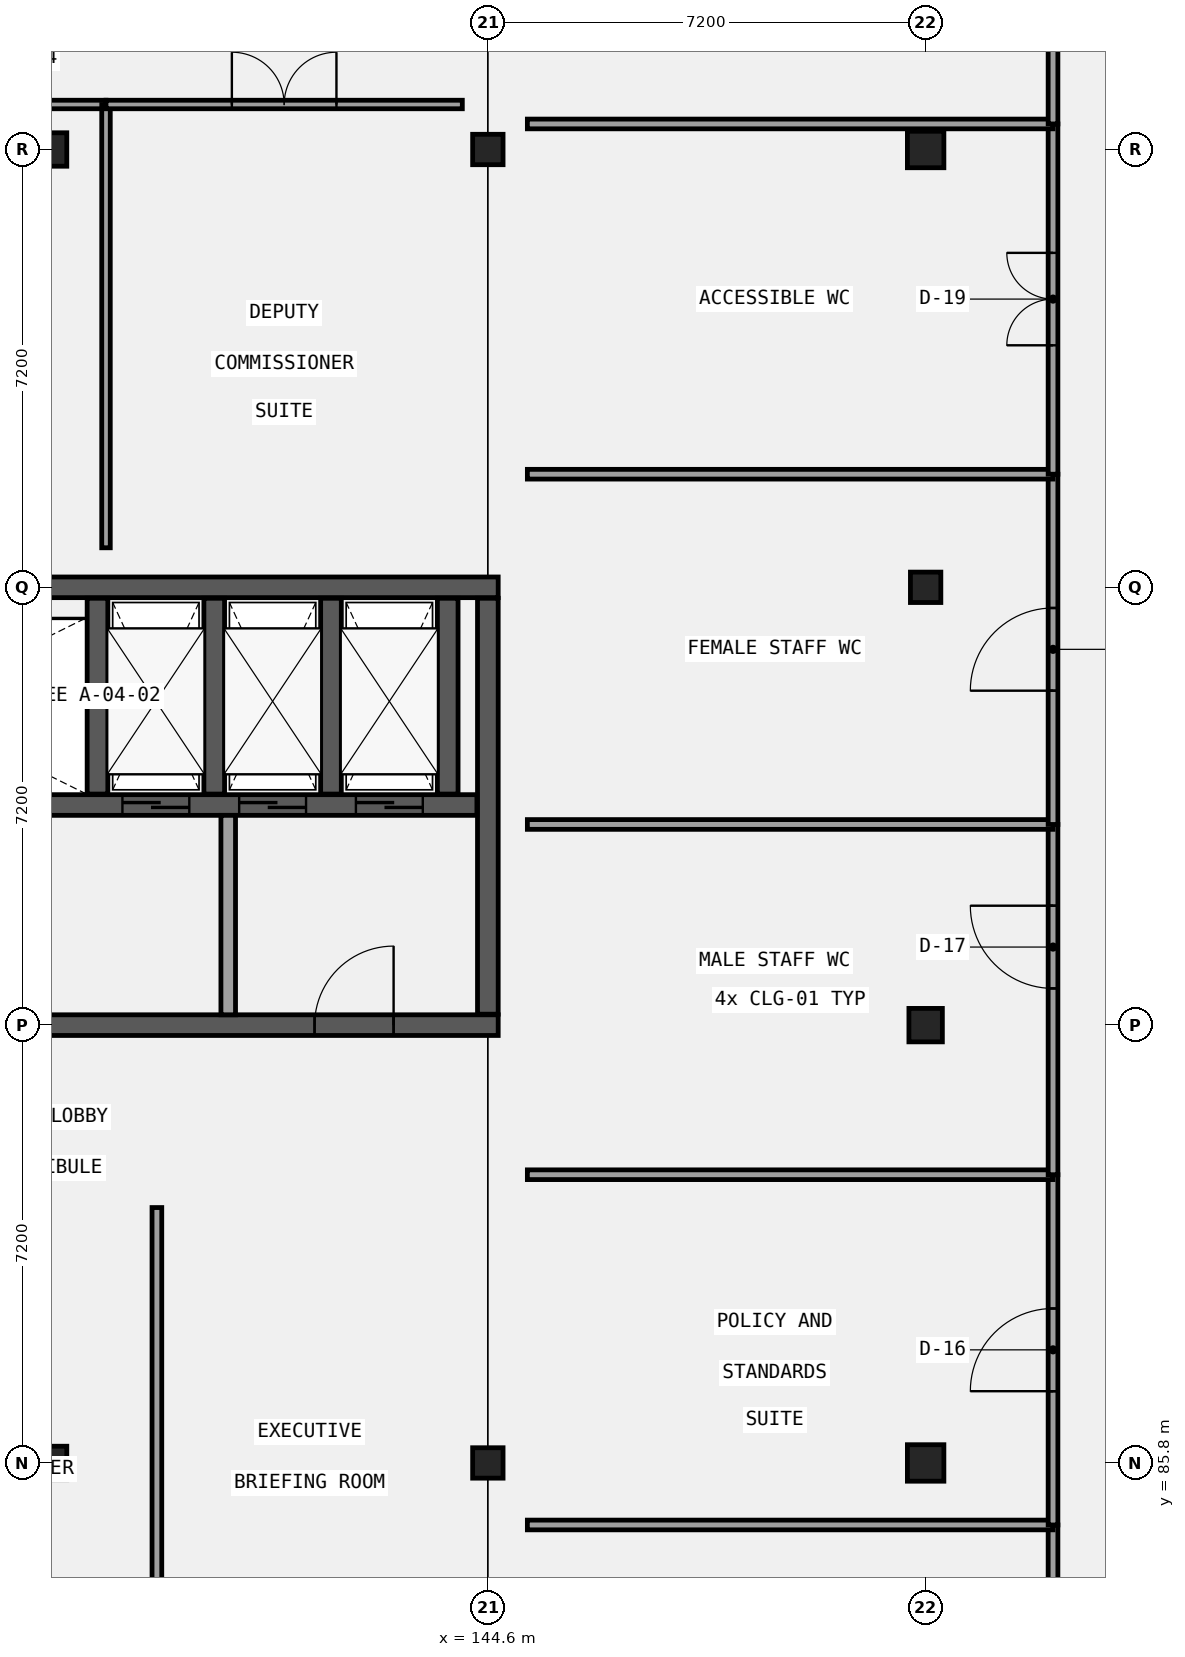
"""IFC4 building model, lengths in metres.
Left out: names, types, materials, properties, quantities, classifications, styles, units other than length and angle.
Written with IfcOpenShell. Run it as: python <this file> out.ifc"""

import sys

from ifc_helpers import new_model, si_unit, direction, frame, frame_2d, origin, origin_2d, place, context, subcontext, project, spatial, rectangle, extrude, element, fill, save


model = new_model("IFC4")
c1 = context("Model", 3, precision=1e-05, world=origin(), true_north=direction((0.0, 1.0)))
c2 = subcontext(c1, "Body", "Model", "MODEL_VIEW")
j1 = project(units=[si_unit("LENGTHUNIT", "METRE"), si_unit("PLANEANGLEUNIT", "RADIAN")], contexts=[c1])
p1 = place(None, origin())
s1 = spatial("IfcSite", under=j1, at=p1, CompositionType="ELEMENT")
p2 = place(p1, origin())
s2 = spatial("IfcBuilding", under=s1, at=p2, CompositionType="ELEMENT")
p3 = place(p2, frame((0.0, 0.0, 22.2)))
s3 = spatial("IfcBuildingStorey", under=s2, at=p3, CompositionType="ELEMENT", Elevation=22.2)
p4 = place(p3, frame((130.03, 100.2, 0.0), z_axis=(0.0, 0.0, 1.0), x_axis=(1.0, 0.0, 0.0)))
e1 = element("IfcWall", 1, at=p4, inside=s3, PredefinedType="SHEAR", context=c2, shape_type="SweptSolid", body=[
    extrude(rectangle(XDim=14.74, YDim=0.34, at=frame_2d((7.37, 0.0))), origin(), (0.0, 0.0, 1.0), 4.2),
])
p5 = place(p3, frame((130.03, 93.0, 0.0), z_axis=(0.0, 0.0, 1.0), x_axis=(1.0, 0.0, 0.0)))
e2 = element("IfcWall", 2, at=p5, inside=s3, PredefinedType="SHEAR", context=c2, shape_type="SweptSolid", body=[
    extrude(rectangle(XDim=14.74, YDim=0.34, at=frame_2d((7.37, 0.0))), origin(), (0.0, 0.0, 1.0), 4.2),
])
p6 = place(p5, frame((3.72, 0.0, 0.0)))
e3 = element("IfcOpeningElement", 3, at=p6, cuts=e2, PredefinedType="OPENING", context=c2, shape_type="SweptSolid", body=[
    extrude(rectangle(XDim=1.3, YDim=2.2, at=frame_2d((0.65, 1.1))), frame((0.0, 0.18, 0.0), z_axis=(0.0, -1.0, 0.0), x_axis=(1.0, 0.0, 0.0)), (0.0, 0.0, 1.0), 0.36),
])
p7 = place(p5, frame((11.72, 0.0, 0.0)))
e4 = element("IfcOpeningElement", 4, at=p7, cuts=e2, PredefinedType="OPENING", context=c2, shape_type="SweptSolid", body=[
    extrude(rectangle(XDim=1.3, YDim=2.2, at=frame_2d((0.65, 1.1))), frame((0.0, 0.18, 0.0), z_axis=(0.0, -1.0, 0.0), x_axis=(1.0, 0.0, 0.0)), (0.0, 0.0, 1.0), 0.36),
])
p8 = place(p3, frame((144.6, 93.18, 0.0), z_axis=(0.0, 0.0, 1.0), x_axis=(0.0, 1.0, 0.0)))
e5 = element("IfcWall", 5, at=p8, inside=s3, PredefinedType="SHEAR", context=c2, shape_type="SweptSolid", body=[
    extrude(rectangle(XDim=6.84, YDim=0.34, at=frame_2d((3.42, 0.0))), origin(), (0.0, 0.0, 1.0), 4.2),
])
p9 = place(p3, frame((130.38, 96.62, 0.0), z_axis=(0.0, 0.0, 1.0), x_axis=(1.0, 0.0, 0.0)))
e6 = element("IfcWall", 6, at=p9, inside=s3, PredefinedType="SHEAR", context=c2, shape_type="SweptSolid", body=[
    extrude(rectangle(XDim=14.04, YDim=0.34, at=frame_2d((7.02, 0.0))), origin(), (0.0, 0.0, 1.0), 4.2),
])
p10 = place(p9, frame((8.21, 0.0, 0.0)))
e7 = element("IfcOpeningElement", 7, at=p10, cuts=e6, PredefinedType="OPENING", context=c2, shape_type="SweptSolid", body=[
    extrude(rectangle(XDim=1.1, YDim=2.15, at=frame_2d((0.55, 1.075))), frame((0.0, 0.18, 0.0), z_axis=(0.0, -1.0, 0.0), x_axis=(1.0, 0.0, 0.0)), (0.0, 0.0, 1.0), 0.36),
])
p11 = place(p9, frame((10.13, 0.0, 0.0)))
e8 = element("IfcOpeningElement", 8, at=p11, cuts=e6, PredefinedType="OPENING", context=c2, shape_type="SweptSolid", body=[
    extrude(rectangle(XDim=1.1, YDim=2.15, at=frame_2d((0.55, 1.075))), frame((0.0, 0.18, 0.0), z_axis=(0.0, -1.0, 0.0), x_axis=(1.0, 0.0, 0.0)), (0.0, 0.0, 1.0), 0.36),
])
p12 = place(p9, frame((12.05, 0.0, 0.0)))
e9 = element("IfcOpeningElement", 9, at=p12, cuts=e6, PredefinedType="OPENING", context=c2, shape_type="SweptSolid", body=[
    extrude(rectangle(XDim=1.1, YDim=2.15, at=frame_2d((0.55, 1.075))), frame((0.0, 0.18, 0.0), z_axis=(0.0, -1.0, 0.0), x_axis=(1.0, 0.0, 0.0)), (0.0, 0.0, 1.0), 0.36),
])
p13 = place(p9, frame((0.395, 0.0, 0.0)))
e10 = element("IfcOpeningElement", 10, at=p13, cuts=e6, PredefinedType="OPENING", context=c2, shape_type="SweptSolid", body=[
    extrude(rectangle(XDim=1.15, YDim=2.15, at=frame_2d((0.575, 1.075))), frame((0.0, 0.18, 0.0), z_axis=(0.0, -1.0, 0.0), x_axis=(1.0, 0.0, 0.0)), (0.0, 0.0, 1.0), 0.36),
])
for number, where, z_axis, x_axis in (
    (11, (138.18, 96.8, 0.0), (0.0, 0.0, 1.0), (0.0, 1.0, 0.0)),
    (12, (140.1, 96.8, 0.0), (0.0, 0.0, 1.0), (0.0, 1.0, 0.0)),
    (13, (142.02, 96.8, 0.0), (0.0, 0.0, 1.0), (0.0, 1.0, 0.0)),
    (14, (143.94, 96.8, 0.0), (0.0, 0.0, 1.0), (0.0, 1.0, 0.0)),
):
    element("IfcWall", number, at=place(p3, frame(where, z_axis=z_axis, x_axis=x_axis)), inside=s3, PredefinedType="SHEAR", context=c2, shape_type="SweptSolid", body=[
        extrude(rectangle(XDim=3.22, YDim=0.34, at=frame_2d((1.61, 0.0))), origin(), (0.0, 0.0, 1.0), 4.2),
    ])
for number, where, z_axis, x_axis in (
    (15, (137.4, 85.8, 0.0), (0.0, 0.0, 1.0), (1.0, 0.0, 0.0)),
    (16, (137.4, 107.4, 0.0), (0.0, 0.0, 1.0), (1.0, 0.0, 0.0)),
):
    element("IfcColumn", number, at=place(p3, frame(where, z_axis=z_axis, x_axis=x_axis)), inside=s3, PredefinedType="COLUMN", context=c2, shape_type="SweptSolid", body=[
        extrude(rectangle(XDim=0.55, YDim=0.55, at=origin_2d()), origin(), (0.0, 0.0, 1.0), 4.2),
    ])
for number, where, z_axis, x_axis in (
    (17, (144.6, 85.8, 0.0), (0.0, 0.0, 1.0), (1.0, 0.0, 0.0)),
    (18, (144.6, 107.4, 0.0), (0.0, 0.0, 1.0), (1.0, 0.0, 0.0)),
):
    element("IfcColumn", number, at=place(p3, frame(where, z_axis=z_axis, x_axis=x_axis)), inside=s3, PredefinedType="COLUMN", context=c2, shape_type="SweptSolid", body=[
        extrude(rectangle(XDim=0.5, YDim=0.5, at=origin_2d()), origin(), (0.0, 0.0, 1.0), 4.2),
    ])
p14 = place(p3, frame((151.8, 85.8, 0.0), z_axis=(0.0, 0.0, 1.0), x_axis=(1.0, 0.0, 0.0)))
e19 = element("IfcColumn", 19, at=p14, inside=s3, PredefinedType="COLUMN", context=c2, shape_type="SweptSolid", body=[
    extrude(rectangle(XDim=0.6, YDim=0.6, at=origin_2d()), origin(), (0.0, 0.0, 1.0), 4.2),
])
p15 = place(p3, frame((151.8, 93.0, 0.0), z_axis=(0.0, 0.0, 1.0), x_axis=(1.0, 0.0, 0.0)))
e20 = element("IfcColumn", 20, at=p15, inside=s3, PredefinedType="COLUMN", context=c2, shape_type="SweptSolid", body=[
    extrude(rectangle(XDim=0.55, YDim=0.55, at=origin_2d()), origin(), (0.0, 0.0, 1.0), 4.2),
])
p16 = place(p3, frame((151.8, 100.2, 0.0), z_axis=(0.0, 0.0, 1.0), x_axis=(1.0, 0.0, 0.0)))
e21 = element("IfcColumn", 21, at=p16, inside=s3, PredefinedType="COLUMN", context=c2, shape_type="SweptSolid", body=[
    extrude(rectangle(XDim=0.5, YDim=0.5, at=origin_2d()), origin(), (0.0, 0.0, 1.0), 4.2),
])
p17 = place(p3, frame((151.8, 107.4, 0.0), z_axis=(0.0, 0.0, 1.0), x_axis=(1.0, 0.0, 0.0)))
e22 = element("IfcColumn", 22, at=p17, inside=s3, PredefinedType="COLUMN", context=c2, shape_type="SweptSolid", body=[
    extrude(rectangle(XDim=0.6, YDim=0.6, at=origin_2d()), origin(), (0.0, 0.0, 1.0), 4.2),
])
p18 = place(p3, frame((140.33, 93.17, 0.0), z_axis=(0.0, 0.0, 1.0), x_axis=(0.0, 1.0, 0.0)))
e23 = element("IfcWall", 23, at=p18, inside=s3, PredefinedType="SOLIDWALL", context=c2, shape_type="SweptSolid", body=[
    extrude(rectangle(XDim=3.28, YDim=0.24, at=frame_2d((1.64, 0.0))), origin(), (0.0, 0.0, 1.0), 3.89),
])
p19 = place(p3, frame((132.46, 108.14, 0.0), z_axis=(0.0, 0.0, 1.0), x_axis=(1.0, 0.0, 0.0)))
e24 = element("IfcWall", 24, at=p19, inside=s3, PredefinedType="PARTITIONING", context=c2, shape_type="SweptSolid", body=[
    extrude(rectangle(XDim=5.86, YDim=0.14, at=frame_2d((2.93, 0.0))), origin(), (0.0, 0.0, 1.0), 3.92),
])
p20 = place(p19, frame((1.291, 0.0, 0.0)))
e25 = element("IfcOpeningElement", 25, at=p20, cuts=e24, PredefinedType="OPENING", context=c2, shape_type="SweptSolid", body=[
    extrude(rectangle(XDim=1.52, YDim=2.35, at=frame_2d((0.76, 1.175))), frame((0.0, 0.08, 0.0), z_axis=(0.0, -1.0, 0.0), x_axis=(1.0, 0.0, 0.0)), (0.0, 0.0, 1.0), 0.16),
])
p21 = place(p3, frame((138.32, 100.85, 0.0), z_axis=(0.0, 0.0, 1.0), x_axis=(0.0, 1.0, 0.0)))
e26 = element("IfcWall", 26, at=p21, inside=s3, PredefinedType="PARTITIONING", context=c2, shape_type="SweptSolid", body=[
    extrude(rectangle(XDim=7.29, YDim=0.14, at=frame_2d((3.645, 0.0))), origin(), (0.0, 0.0, 1.0), 3.92),
])
p22 = place(p3, frame((138.32, 108.14, 0.0), z_axis=(0.0, 0.0, 1.0), x_axis=(1.0, 0.0, 0.0)))
e27 = element("IfcWall", 27, at=p22, inside=s3, PredefinedType="PARTITIONING", context=c2, shape_type="SweptSolid", body=[
    extrude(rectangle(XDim=5.86, YDim=0.14, at=frame_2d((2.93, 0.0))), origin(), (0.0, 0.0, 1.0), 3.92),
])
p23 = place(p22, frame((2.07, 0.0, 0.0)))
e28 = element("IfcOpeningElement", 28, at=p23, cuts=e27, PredefinedType="OPENING", context=c2, shape_type="SweptSolid", body=[
    extrude(rectangle(XDim=1.72, YDim=2.1, at=frame_2d((0.86, 1.05))), frame((0.0, 0.08, 0.0), z_axis=(0.0, -1.0, 0.0), x_axis=(1.0, 0.0, 0.0)), (0.0, 0.0, 1.0), 0.16),
])
p24 = place(p3, frame((139.157, 81.64, 0.0), z_axis=(0.0, 0.0, 1.0), x_axis=(0.0, 1.0, 0.0)))
e29 = element("IfcWall", 29, at=p24, inside=s3, PredefinedType="PARTITIONING", context=c2, shape_type="SweptSolid", body=[
    extrude(rectangle(XDim=8.36, YDim=0.16, at=frame_2d((4.18, 0.0))), origin(), (0.0, 0.0, 1.0), 3.92),
])
p25 = place(p3, frame((153.895, 79.02, 0.0), z_axis=(0.0, 0.0, 1.0), x_axis=(0.0, 1.0, 0.0)))
e30 = element("IfcWall", 30, at=p25, inside=s3, PredefinedType="PARTITIONING", context=c2, shape_type="SweptSolid", body=[
    extrude(rectangle(XDim=5.76, YDim=0.16, at=frame_2d((2.88, 0.0))), origin(), (0.0, 0.0, 1.0), 3.92),
])
p26 = place(p25, frame((2.27, 0.0, 0.0)))
e31 = element("IfcOpeningElement", 31, at=p26, cuts=e30, PredefinedType="OPENING", context=c2, shape_type="SweptSolid", body=[
    extrude(rectangle(XDim=1.22, YDim=2.35, at=frame_2d((0.61, 1.175))), frame((0.0, 0.09, 0.0), z_axis=(0.0, -1.0, 0.0), x_axis=(1.0, 0.0, 0.0)), (0.0, 0.0, 1.0), 0.18),
])
p27 = place(p3, frame((145.25, 84.78, 0.0), z_axis=(0.0, 0.0, 1.0), x_axis=(1.0, 0.0, 0.0)))
e32 = element("IfcWall", 32, at=p27, inside=s3, PredefinedType="PARTITIONING", context=c2, shape_type="SweptSolid", body=[
    extrude(rectangle(XDim=8.645, YDim=0.16, at=frame_2d((4.323, 0.0))), origin(), (0.0, 0.0, 1.0), 3.92),
])
p28 = place(p3, frame((153.895, 84.78, 0.0), z_axis=(0.0, 0.0, 1.0), x_axis=(0.0, 1.0, 0.0)))
e33 = element("IfcWall", 33, at=p28, inside=s3, PredefinedType="PARTITIONING", context=c2, shape_type="SweptSolid", body=[
    extrude(rectangle(XDim=5.76, YDim=0.16, at=frame_2d((2.88, 0.0))), origin(), (0.0, 0.0, 1.0), 3.92),
])
p29 = place(p28, frame((2.2, 0.0, 0.0)))
e34 = element("IfcOpeningElement", 34, at=p29, cuts=e33, PredefinedType="OPENING", context=c2, shape_type="SweptSolid", body=[
    extrude(rectangle(XDim=1.36, YDim=2.1, at=frame_2d((0.68, 1.05))), frame((0.0, 0.09, 0.0), z_axis=(0.0, -1.0, 0.0), x_axis=(1.0, 0.0, 0.0)), (0.0, 0.0, 1.0), 0.18),
])
p30 = place(p3, frame((145.25, 90.54, 0.0), z_axis=(0.0, 0.0, 1.0), x_axis=(1.0, 0.0, 0.0)))
e35 = element("IfcWall", 35, at=p30, inside=s3, PredefinedType="PARTITIONING", context=c2, shape_type="SweptSolid", body=[
    extrude(rectangle(XDim=8.645, YDim=0.16, at=frame_2d((4.323, 0.0))), origin(), (0.0, 0.0, 1.0), 3.92),
])
p31 = place(p3, frame((153.895, 90.54, 0.0), z_axis=(0.0, 0.0, 1.0), x_axis=(0.0, 1.0, 0.0)))
e36 = element("IfcWall", 36, at=p31, inside=s3, PredefinedType="PARTITIONING", context=c2, shape_type="SweptSolid", body=[
    extrude(rectangle(XDim=5.76, YDim=0.16, at=frame_2d((2.88, 0.0))), origin(), (0.0, 0.0, 1.0), 3.92),
])
p32 = place(p31, frame((3.064, 0.0, 0.0)))
e37 = element("IfcOpeningElement", 37, at=p32, cuts=e36, PredefinedType="OPENING", context=c2, shape_type="SweptSolid", body=[
    extrude(rectangle(XDim=1.36, YDim=2.22, at=frame_2d((0.68, 1.11))), frame((0.0, 0.09, 0.0), z_axis=(0.0, -1.0, 0.0), x_axis=(1.0, 0.0, 0.0)), (0.0, 0.0, 1.0), 0.18),
])
p33 = place(p3, frame((145.25, 96.3, 0.0), z_axis=(0.0, 0.0, 1.0), x_axis=(1.0, 0.0, 0.0)))
e38 = element("IfcWall", 38, at=p33, inside=s3, PredefinedType="PARTITIONING", context=c2, shape_type="SweptSolid", body=[
    extrude(rectangle(XDim=8.645, YDim=0.16, at=frame_2d((4.323, 0.0))), origin(), (0.0, 0.0, 1.0), 3.92),
])
p34 = place(p3, frame((153.895, 96.3, 0.0), z_axis=(0.0, 0.0, 1.0), x_axis=(0.0, 1.0, 0.0)))
e39 = element("IfcWall", 39, at=p34, inside=s3, PredefinedType="PARTITIONING", context=c2, shape_type="SweptSolid", body=[
    extrude(rectangle(XDim=5.76, YDim=0.16, at=frame_2d((2.88, 0.0))), origin(), (0.0, 0.0, 1.0), 3.92),
])
p35 = place(p34, frame((2.2, 0.0, 0.0)))
e40 = element("IfcOpeningElement", 40, at=p35, cuts=e39, PredefinedType="OPENING", context=c2, shape_type="SweptSolid", body=[
    extrude(rectangle(XDim=1.36, YDim=2.35, at=frame_2d((0.68, 1.175))), frame((0.0, 0.09, 0.0), z_axis=(0.0, -1.0, 0.0), x_axis=(1.0, 0.0, 0.0)), (0.0, 0.0, 1.0), 0.18),
])
p36 = place(p3, frame((145.25, 102.06, 0.0), z_axis=(0.0, 0.0, 1.0), x_axis=(1.0, 0.0, 0.0)))
e41 = element("IfcWall", 41, at=p36, inside=s3, PredefinedType="PARTITIONING", context=c2, shape_type="SweptSolid", body=[
    extrude(rectangle(XDim=8.645, YDim=0.16, at=frame_2d((4.323, 0.0))), origin(), (0.0, 0.0, 1.0), 3.37),
])
p37 = place(p3, frame((153.895, 102.06, 0.0), z_axis=(0.0, 0.0, 1.0), x_axis=(0.0, 1.0, 0.0)))
e42 = element("IfcWall", 42, at=p37, inside=s3, PredefinedType="PARTITIONING", context=c2, shape_type="SweptSolid", body=[
    extrude(rectangle(XDim=5.76, YDim=0.16, at=frame_2d((2.88, 0.0))), origin(), (0.0, 0.0, 1.0), 3.92),
])
p38 = place(p37, frame((2.12, 0.0, 0.0)))
e43 = element("IfcOpeningElement", 43, at=p38, cuts=e42, PredefinedType="OPENING", context=c2, shape_type="SweptSolid", body=[
    extrude(rectangle(XDim=1.52, YDim=2.1, at=frame_2d((0.76, 1.05))), frame((0.0, 0.09, 0.0), z_axis=(0.0, -1.0, 0.0), x_axis=(1.0, 0.0, 0.0)), (0.0, 0.0, 1.0), 0.18),
])
p39 = place(p3, frame((145.25, 107.82, 0.0), z_axis=(0.0, 0.0, 1.0), x_axis=(1.0, 0.0, 0.0)))
e44 = element("IfcWall", 44, at=p39, inside=s3, PredefinedType="PARTITIONING", context=c2, shape_type="SweptSolid", body=[
    extrude(rectangle(XDim=8.645, YDim=0.16, at=frame_2d((4.323, 0.0))), origin(), (0.0, 0.0, 1.0), 3.92),
])
p40 = place(p3, frame((153.895, 107.82, 0.0), z_axis=(0.0, 0.0, 1.0), x_axis=(0.0, 1.0, 0.0)))
e45 = element("IfcWall", 45, at=p40, inside=s3, PredefinedType="PARTITIONING", context=c2, shape_type="SweptSolid", body=[
    extrude(rectangle(XDim=5.76, YDim=0.16, at=frame_2d((2.88, 0.0))), origin(), (0.0, 0.0, 1.0), 3.92),
])
p41 = place(p40, frame((2.12, 0.0, 0.0)))
e46 = element("IfcOpeningElement", 46, at=p41, cuts=e45, PredefinedType="OPENING", context=c2, shape_type="SweptSolid", body=[
    extrude(rectangle(XDim=1.52, YDim=2.22, at=frame_2d((0.76, 1.11))), frame((0.0, 0.09, 0.0), z_axis=(0.0, -1.0, 0.0), x_axis=(1.0, 0.0, 0.0)), (0.0, 0.0, 1.0), 0.18),
])
p42 = place(p10, frame((1.1, 0.0, 0.0), z_axis=(0.0, 0.0, 1.0), x_axis=(-1.0, 0.0, 0.0)))
e47 = element("IfcDoor", 47, at=p42, inside=s3, OperationType="DOUBLE_DOOR_SLIDING", PredefinedType="DOOR", context=c2, shape_type="SweptSolid", body=[
    extrude(rectangle(XDim=1.1, YDim=2.15, at=frame_2d((0.55, 1.075))), frame((0.0, 0.025, 0.0), z_axis=(0.0, -1.0, 0.0), x_axis=(1.0, 0.0, 0.0)), (0.0, 0.0, 1.0), 0.05),
])
fill(e7, e47)
p43 = place(p11, frame((1.1, 0.0, 0.0), z_axis=(0.0, 0.0, 1.0), x_axis=(-1.0, 0.0, 0.0)))
e48 = element("IfcDoor", 48, at=p43, inside=s3, OperationType="DOUBLE_DOOR_SLIDING", PredefinedType="DOOR", context=c2, shape_type="SweptSolid", body=[
    extrude(rectangle(XDim=1.1, YDim=2.15, at=frame_2d((0.55, 1.075))), frame((0.0, 0.025, 0.0), z_axis=(0.0, -1.0, 0.0), x_axis=(1.0, 0.0, 0.0)), (0.0, 0.0, 1.0), 0.05),
])
fill(e8, e48)
p44 = place(p12, frame((1.1, 0.0, 0.0), z_axis=(0.0, 0.0, 1.0), x_axis=(-1.0, 0.0, 0.0)))
e49 = element("IfcDoor", 49, at=p44, inside=s3, OperationType="DOUBLE_DOOR_SLIDING", PredefinedType="DOOR", context=c2, shape_type="SweptSolid", body=[
    extrude(rectangle(XDim=1.1, YDim=2.15, at=frame_2d((0.55, 1.075))), frame((0.0, 0.025, 0.0), z_axis=(0.0, -1.0, 0.0), x_axis=(1.0, 0.0, 0.0)), (0.0, 0.0, 1.0), 0.05),
])
fill(e9, e49)
p45 = place(p7, frame((1.3, 0.0, 0.0), z_axis=(0.0, 0.0, 1.0), x_axis=(-1.0, 0.0, 0.0)))
e50 = element("IfcDoor", 50, at=p45, inside=s3, OperationType="SINGLE_SWING_RIGHT", PredefinedType="DOOR", context=c2, shape_type="SweptSolid", body=[
    extrude(rectangle(XDim=1.3, YDim=2.2, at=frame_2d((0.65, 1.1))), frame((0.0, 0.025, 0.0), z_axis=(0.0, -1.0, 0.0), x_axis=(1.0, 0.0, 0.0)), (0.0, 0.0, 1.0), 0.05),
])
fill(e4, e50)
p46 = place(p23, frame((1.72, 0.0, 0.0), z_axis=(0.0, 0.0, 1.0), x_axis=(-1.0, 0.0, 0.0)))
e51 = element("IfcDoor", 51, at=p46, inside=s3, OperationType="DOUBLE_DOOR_SINGLE_SWING", PredefinedType="DOOR", context=c2, shape_type="SweptSolid", body=[
    extrude(rectangle(XDim=1.72, YDim=2.1, at=frame_2d((0.86, 1.05))), frame((0.0, 0.025, 0.0), z_axis=(0.0, -1.0, 0.0), x_axis=(1.0, 0.0, 0.0)), (0.0, 0.0, 1.0), 0.05),
])
fill(e28, e51)
p47 = place(p29, frame((1.36, 0.0, 0.0), z_axis=(0.0, 0.0, 1.0), x_axis=(-1.0, 0.0, 0.0)))
e52 = element("IfcDoor", 52, at=p47, inside=s3, OperationType="SINGLE_SWING_LEFT", PredefinedType="DOOR", context=c2, shape_type="SweptSolid", body=[
    extrude(rectangle(XDim=1.36, YDim=2.1, at=frame_2d((0.68, 1.05))), frame((0.0, 0.025, 0.0), z_axis=(0.0, -1.0, 0.0), x_axis=(1.0, 0.0, 0.0)), (0.0, 0.0, 1.0), 0.05),
])
fill(e34, e52)
p48 = place(p32, frame((1.36, 0.0, 0.0), z_axis=(0.0, 0.0, 1.0), x_axis=(-1.0, 0.0, 0.0)))
e53 = element("IfcDoor", 53, at=p48, inside=s3, OperationType="SINGLE_SWING_RIGHT", PredefinedType="DOOR", context=c2, shape_type="SweptSolid", body=[
    extrude(rectangle(XDim=1.36, YDim=2.22, at=frame_2d((0.68, 1.11))), frame((0.0, 0.025, 0.0), z_axis=(0.0, -1.0, 0.0), x_axis=(1.0, 0.0, 0.0)), (0.0, 0.0, 1.0), 0.05),
])
fill(e37, e53)
p49 = place(p35, frame((1.36, 0.0, 0.0), z_axis=(0.0, 0.0, 1.0), x_axis=(-1.0, 0.0, 0.0)))
e54 = element("IfcDoor", 54, at=p49, inside=s3, OperationType="SINGLE_SWING_LEFT", PredefinedType="DOOR", context=c2, shape_type="SweptSolid", body=[
    extrude(rectangle(XDim=1.36, YDim=2.35, at=frame_2d((0.68, 1.175))), frame((0.0, 0.025, 0.0), z_axis=(0.0, -1.0, 0.0), x_axis=(1.0, 0.0, 0.0)), (0.0, 0.0, 1.0), 0.05),
])
fill(e40, e54)
p50 = place(p38, frame((1.52, 0.0, 0.0), z_axis=(0.0, 0.0, 1.0), x_axis=(-1.0, 0.0, 0.0)))
e55 = element("IfcDoor", 55, at=p50, inside=s3, OperationType="DOUBLE_DOOR_SINGLE_SWING", PredefinedType="DOOR", context=c2, shape_type="SweptSolid", body=[
    extrude(rectangle(XDim=1.52, YDim=2.1, at=frame_2d((0.76, 1.05))), frame((0.0, 0.025, 0.0), z_axis=(0.0, -1.0, 0.0), x_axis=(1.0, 0.0, 0.0)), (0.0, 0.0, 1.0), 0.05),
])
fill(e43, e55)
save(model, sys.argv[1])
